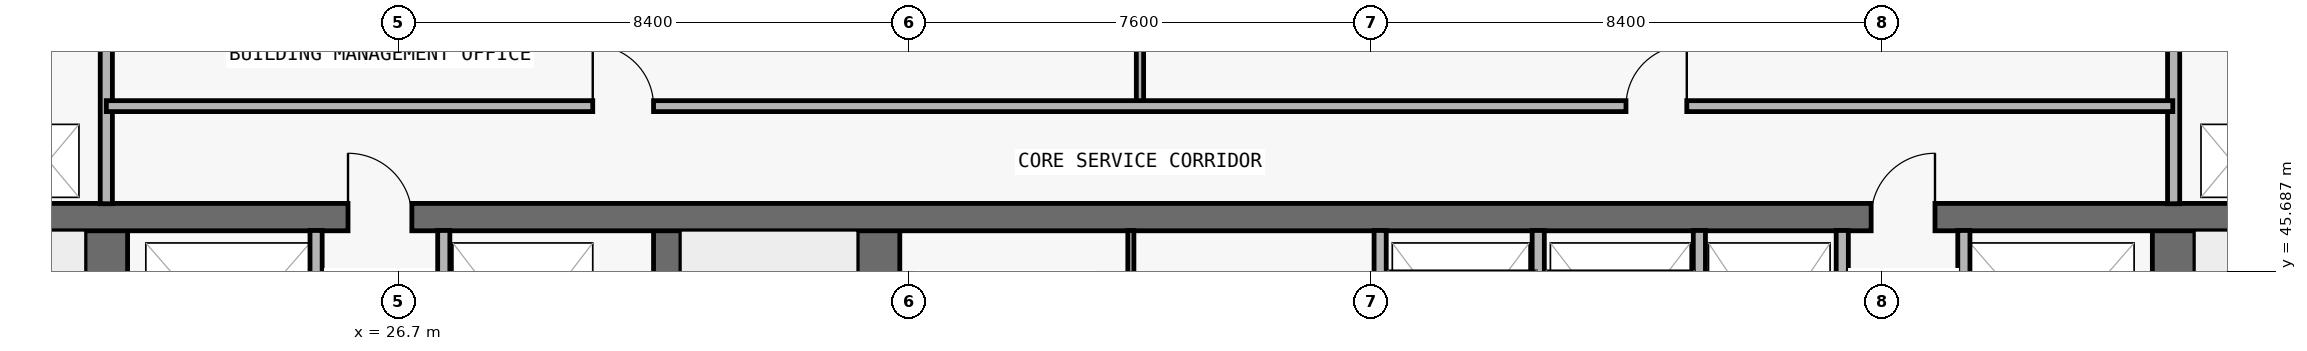
"""IFC4 building model, lengths in metres.
Left out: names, types, materials, properties, quantities, classifications, styles, units other than length and angle.
Written with IfcOpenShell. Run it as: python <this file> out.ifc"""

import sys

from ifc_helpers import new_model, si_unit, direction, frame, frame_2d, origin, place, context, subcontext, project, spatial, rectangle, extrude, element, fill, save


model = new_model("IFC4")
c1 = context("Model", 3, precision=1e-05, world=origin(), true_north=direction((0.0, 1.0)))
c2 = subcontext(c1, "Body", "Model", "MODEL_VIEW")
j1 = project(units=[si_unit("LENGTHUNIT", "METRE"), si_unit("PLANEANGLEUNIT", "RADIAN")], contexts=[c1])
p1 = place(None, origin())
s1 = spatial("IfcSite", under=j1, at=p1, CompositionType="ELEMENT")
p2 = place(p1, origin())
s2 = spatial("IfcBuilding", under=s1, at=p2, CompositionType="ELEMENT")
p3 = place(p2, frame((0.0, 0.0, 135.6)))
s3 = spatial("IfcBuildingStorey", under=s2, at=p3, CompositionType="ELEMENT", Elevation=135.6)
p4 = place(p3, frame((21.9, 36.95, 0.0), z_axis=(0.0, 0.0, 1.0), x_axis=(0.0, 1.0, 0.0)))
e1 = element("IfcWall", 1, at=p4, inside=s3, PredefinedType="SHEAR", context=c2, shape_type="SweptSolid", body=[
    extrude(rectangle(XDim=9.625, YDim=0.7, at=frame_2d((4.812, 0.0))), origin(), (0.0, 0.0, 1.0), 3.05),
])
p5 = place(p4, frame((0.6, 0.0, 0.0)))
e2 = element("IfcOpeningElement", 2, at=p5, cuts=e1, PredefinedType="OPENING", context=c2, shape_type="SweptSolid", body=[
    extrude(rectangle(XDim=1.1, YDim=2.15, at=frame_2d((0.55, 1.075))), frame((0.0, 0.36, 0.0), z_axis=(0.0, -1.0, 0.0), x_axis=(1.0, 0.0, 0.0)), (0.0, 0.0, 1.0), 0.72),
])
p6 = place(p3, frame((55.9, 36.95, 0.0), z_axis=(0.0, 0.0, 1.0), x_axis=(0.0, 1.0, 0.0)))
e3 = element("IfcWall", 3, at=p6, inside=s3, PredefinedType="SHEAR", context=c2, shape_type="SweptSolid", body=[
    extrude(rectangle(XDim=9.625, YDim=0.7, at=frame_2d((4.812, 0.0))), origin(), (0.0, 0.0, 1.0), 3.05),
])
p7 = place(p6, frame((0.6, 0.0, 0.0)))
e4 = element("IfcOpeningElement", 4, at=p7, cuts=e3, PredefinedType="OPENING", context=c2, shape_type="SweptSolid", body=[
    extrude(rectangle(XDim=1.1, YDim=2.15, at=frame_2d((0.55, 1.075))), frame((0.0, 0.36, 0.0), z_axis=(0.0, -1.0, 0.0), x_axis=(1.0, 0.0, 0.0)), (0.0, 0.0, 1.0), 0.72),
])
p8 = place(p3, frame((31.125, 36.95, 0.0), z_axis=(0.0, 0.0, 1.0), x_axis=(0.0, 1.0, 0.0)))
e5 = element("IfcWall", 5, at=p8, inside=s3, PredefinedType="SHEAR", context=c2, shape_type="SweptSolid", body=[
    extrude(rectangle(XDim=9.625, YDim=0.45, at=frame_2d((4.812, 0.0))), origin(), (0.0, 0.0, 1.0), 3.05),
])
p9 = place(p3, frame((34.6, 36.95, 0.0), z_axis=(0.0, 0.0, 1.0), x_axis=(0.0, 1.0, 0.0)))
e6 = element("IfcWall", 6, at=p9, inside=s3, PredefinedType="SHEAR", context=c2, shape_type="SweptSolid", body=[
    extrude(rectangle(XDim=9.625, YDim=0.7, at=frame_2d((4.812, 0.0))), origin(), (0.0, 0.0, 1.0), 3.05),
])
p10 = place(p3, frame((18.25, 46.575, 0.0), z_axis=(0.0, 0.0, 1.0), x_axis=(1.0, 0.0, 0.0)))
e7 = element("IfcWall", 7, at=p10, inside=s3, PredefinedType="SHEAR", context=c2, shape_type="SweptSolid", body=[
    extrude(rectangle(XDim=41.3, YDim=0.45, at=frame_2d((20.65, 0.0))), origin(), (0.0, 0.0, 1.0), 3.05),
])
p11 = place(p10, frame((7.625, 0.0, 0.0)))
e8 = element("IfcOpeningElement", 8, at=p11, cuts=e7, PredefinedType="OPENING", context=c2, shape_type="SweptSolid", body=[
    extrude(rectangle(XDim=1.05, YDim=2.15, at=frame_2d((0.525, 1.075))), frame((0.0, 0.235, 0.0), z_axis=(0.0, -1.0, 0.0), x_axis=(1.0, 0.0, 0.0)), (0.0, 0.0, 1.0), 0.47),
])
p12 = place(p10, frame((32.675, 0.0, 0.0)))
e9 = element("IfcOpeningElement", 9, at=p12, cuts=e7, PredefinedType="OPENING", context=c2, shape_type="SweptSolid", body=[
    extrude(rectangle(XDim=1.05, YDim=2.15, at=frame_2d((0.525, 1.075))), frame((0.0, 0.235, 0.0), z_axis=(0.0, -1.0, 0.0), x_axis=(1.0, 0.0, 0.0)), (0.0, 0.0, 1.0), 0.47),
])
p13 = place(p3, frame((21.9, 46.795, 0.0), z_axis=(0.0, 0.0, 1.0), x_axis=(0.0, 1.0, 0.0)))
e10 = element("IfcWall", 10, at=p13, inside=s3, PredefinedType="PARTITIONING", context=c2, shape_type="SweptSolid", body=[
    extrude(rectangle(XDim=3.16, YDim=0.2, at=frame_2d((1.58, 0.0))), origin(), (0.0, 0.0, 1.0), 3.05),
])
for number, where, z_axis, x_axis in (
    (11, (25.35, 43.17, 0.0), (0.0, 0.0, 1.0), (0.0, 1.0, 0.0)),
    (12, (27.45, 43.17, 0.0), (0.0, 0.0, 1.0), (0.0, 1.0, 0.0)),
):
    element("IfcWall", number, at=place(p3, frame(where, z_axis=z_axis, x_axis=x_axis)), inside=s3, PredefinedType="PARTITIONING", context=c2, shape_type="SweptSolid", body=[
        extrude(rectangle(XDim=3.185, YDim=0.2, at=frame_2d((1.593, 0.0))), origin(), (0.0, 0.0, 1.0), 3.05),
    ])
p14 = place(p3, frame((38.75, 43.17, 0.0), z_axis=(0.0, 0.0, 1.0), x_axis=(0.0, 1.0, 0.0)))
e13 = element("IfcWall", 13, at=p14, inside=s3, PredefinedType="MOVABLE", context=c2, shape_type="SweptSolid", body=[
    extrude(rectangle(XDim=3.185, YDim=0.1, at=frame_2d((1.593, 0.0))), origin(), (0.0, 0.0, 1.0), 3.05),
])
p15 = place(p3, frame((38.9, 48.4, 0.0), z_axis=(0.0, 0.0, 1.0), x_axis=(0.0, 1.0, 0.0)))
e14 = element("IfcWall", 14, at=p15, inside=s3, PredefinedType="PARTITIONING", context=c2, shape_type="SweptSolid", body=[
    extrude(rectangle(XDim=1.555, YDim=0.12, at=frame_2d((0.778, 0.0))), origin(), (0.0, 0.0, 1.0), 3.05),
])
for number, where, z_axis, x_axis in (
    (15, (42.85, 43.17, 0.0), (0.0, 0.0, 1.0), (0.0, 1.0, 0.0)),
    (16, (45.45, 43.17, 0.0), (0.0, 0.0, 1.0), (0.0, 1.0, 0.0)),
    (17, (48.1, 43.17, 0.0), (0.0, 0.0, 1.0), (0.0, 1.0, 0.0)),
    (18, (50.45, 43.17, 0.0), (0.0, 0.0, 1.0), (0.0, 1.0, 0.0)),
    (19, (52.45, 43.17, 0.0), (0.0, 0.0, 1.0), (0.0, 1.0, 0.0)),
):
    element("IfcWall", number, at=place(p3, frame(where, z_axis=z_axis, x_axis=x_axis)), inside=s3, PredefinedType="PARTITIONING", context=c2, shape_type="SweptSolid", body=[
        extrude(rectangle(XDim=3.185, YDim=0.2, at=frame_2d((1.593, 0.0))), origin(), (0.0, 0.0, 1.0), 3.05),
    ])
p16 = place(p3, frame((55.9, 46.795, 0.0), z_axis=(0.0, 0.0, 1.0), x_axis=(0.0, 1.0, 0.0)))
e20 = element("IfcWall", 20, at=p16, inside=s3, PredefinedType="PARTITIONING", context=c2, shape_type="SweptSolid", body=[
    extrude(rectangle(XDim=3.16, YDim=0.2, at=frame_2d((1.58, 0.0))), origin(), (0.0, 0.0, 1.0), 3.05),
])
p17 = place(p3, frame((21.9, 48.4, 0.0), z_axis=(0.0, 0.0, 1.0), x_axis=(1.0, 0.0, 0.0)))
e21 = element("IfcWall", 21, at=p17, inside=s3, PredefinedType="PARTITIONING", context=c2, shape_type="SweptSolid", body=[
    extrude(rectangle(XDim=33.986, YDim=0.18, at=frame_2d((16.993, 0.0))), origin(), (0.0, 0.0, 1.0), 3.05),
])
p18 = place(p17, frame((8.0, 0.0, 0.0)))
e22 = element("IfcOpeningElement", 22, at=p18, cuts=e21, PredefinedType="OPENING", context=c2, shape_type="SweptSolid", body=[
    extrude(rectangle(XDim=1.0, YDim=2.2, at=frame_2d((0.5, 1.1))), frame((0.0, 0.1, 0.0), z_axis=(0.0, -1.0, 0.0), x_axis=(1.0, 0.0, 0.0)), (0.0, 0.0, 1.0), 0.2),
])
p19 = place(p17, frame((24.993, 0.0, 0.0)))
e23 = element("IfcOpeningElement", 23, at=p19, cuts=e21, PredefinedType="OPENING", context=c2, shape_type="SweptSolid", body=[
    extrude(rectangle(XDim=1.0, YDim=2.2, at=frame_2d((0.5, 1.1))), frame((0.0, 0.1, 0.0), z_axis=(0.0, -1.0, 0.0), x_axis=(1.0, 0.0, 0.0)), (0.0, 0.0, 1.0), 0.2),
])
p20 = place(p11, origin())
e24 = element("IfcDoor", 24, at=p20, inside=s3, OperationType="SINGLE_SWING_LEFT", PredefinedType="DOOR", context=c2, shape_type="SweptSolid", body=[
    extrude(rectangle(XDim=1.05, YDim=2.15, at=frame_2d((0.525, 1.075))), frame((0.0, 0.025, 0.0), z_axis=(0.0, -1.0, 0.0), x_axis=(1.0, 0.0, 0.0)), (0.0, 0.0, 1.0), 0.05),
])
fill(e8, e24)
p21 = place(p12, origin())
e25 = element("IfcDoor", 25, at=p21, inside=s3, OperationType="SINGLE_SWING_RIGHT", PredefinedType="DOOR", context=c2, shape_type="SweptSolid", body=[
    extrude(rectangle(XDim=1.05, YDim=2.15, at=frame_2d((0.525, 1.075))), frame((0.0, 0.025, 0.0), z_axis=(0.0, -1.0, 0.0), x_axis=(1.0, 0.0, 0.0)), (0.0, 0.0, 1.0), 0.05),
])
fill(e9, e25)
p22 = place(p18, origin())
e26 = element("IfcDoor", 26, at=p22, inside=s3, OperationType="SINGLE_SWING_LEFT", PredefinedType="DOOR", context=c2, shape_type="SweptSolid", body=[
    extrude(rectangle(XDim=1.0, YDim=2.2, at=frame_2d((0.5, 1.1))), frame((0.0, 0.025, 0.0), z_axis=(0.0, -1.0, 0.0), x_axis=(1.0, 0.0, 0.0)), (0.0, 0.0, 1.0), 0.05),
])
fill(e22, e26)
p23 = place(p19, origin())
e27 = element("IfcDoor", 27, at=p23, inside=s3, OperationType="SINGLE_SWING_RIGHT", PredefinedType="DOOR", context=c2, shape_type="SweptSolid", body=[
    extrude(rectangle(XDim=1.0, YDim=2.2, at=frame_2d((0.5, 1.1))), frame((0.0, 0.025, 0.0), z_axis=(0.0, -1.0, 0.0), x_axis=(1.0, 0.0, 0.0)), (0.0, 0.0, 1.0), 0.05),
])
fill(e23, e27)
save(model, sys.argv[1])
